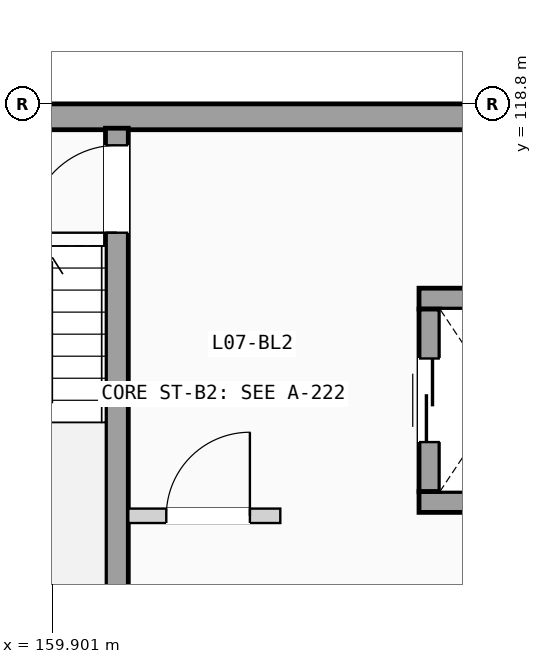
"""IFC4 building model, lengths in metres.
Left out: names, types, materials, properties, quantities, classifications, styles, units other than length and angle.
Written with IfcOpenShell. Run it as: python <this file> out.ifc"""

import sys

from ifc_helpers import new_model, si_unit, direction, frame, frame_2d, origin, place, context, subcontext, project, spatial, rectangle, extrude, element, fill, save


model = new_model("IFC4")
c1 = context("Model", 3, precision=1e-05, world=origin(), true_north=direction((0.0, 1.0)))
c2 = subcontext(c1, "Body", "Model", "MODEL_VIEW")
j1 = project(units=[si_unit("LENGTHUNIT", "METRE"), si_unit("PLANEANGLEUNIT", "RADIAN")], contexts=[c1])
p1 = place(None, origin())
s1 = spatial("IfcSite", under=j1, at=p1, CompositionType="ELEMENT")
p2 = place(p1, origin())
s2 = spatial("IfcBuilding", under=s1, at=p2, CompositionType="ELEMENT")
p3 = place(p2, frame((0.0, 0.0, 24.675)))
s3 = spatial("IfcBuildingStorey", under=s2, at=p3, CompositionType="ELEMENT", Elevation=24.675)
p4 = place(p3, frame((151.2, 118.63, 0.0), z_axis=(0.0, 0.0, 1.0), x_axis=(1.0, 0.0, 0.0)))
e1 = element("IfcWall", 1, at=p4, inside=s3, PredefinedType="SOLIDWALL", context=c2, shape_type="SweptSolid", body=[
    extrude(rectangle(XDim=21.6, YDim=0.34, at=frame_2d((10.8, 0.0))), origin(), (0.0, 0.0, 1.0), 2.9),
])
p5 = place(p3, frame((160.75, 111.48, 0.0), z_axis=(0.0, 0.0, 1.0), x_axis=(0.0, 1.0, 0.0)))
e2 = element("IfcWall", 2, at=p5, inside=s3, PredefinedType="SHEAR", context=c2, shape_type="SweptSolid", body=[
    extrude(rectangle(XDim=7.0, YDim=0.3, at=frame_2d((3.5, 0.0))), origin(), (0.0, 0.0, 1.0), 2.9),
])
p6 = place(p5, frame((5.625, 0.0, 0.0)))
e3 = element("IfcOpeningElement", 3, at=p6, cuts=e2, PredefinedType="OPENING", context=c2, shape_type="SweptSolid", body=[
    extrude(rectangle(XDim=1.15, YDim=2.12, at=frame_2d((0.575, 1.06))), frame((0.0, 0.16, 0.0), z_axis=(0.0, -1.0, 0.0), x_axis=(1.0, 0.0, 0.0)), (0.0, 0.0, 1.0), 0.32),
])
for number, where, z_axis, x_axis in (
    (4, (164.725, 113.562, 0.0), (0.0, 0.0, 1.0), (1.0, 0.0, 0.0)),
    (5, (164.725, 116.238, 0.0), (0.0, 0.0, 1.0), (1.0, 0.0, 0.0)),
):
    element("IfcWall", number, at=place(p3, frame(where, z_axis=z_axis, x_axis=x_axis)), inside=s3, PredefinedType="SHEAR", context=c2, shape_type="SweptSolid", body=[
        extrude(rectangle(XDim=2.15, YDim=0.275, at=frame_2d((1.075, 0.0))), origin(), (0.0, 0.0, 1.0), 2.9),
    ])
p7 = place(p3, frame((164.863, 113.7, 0.0), z_axis=(0.0, 0.0, 1.0), x_axis=(0.0, 1.0, 0.0)))
e6 = element("IfcWall", 6, at=p7, inside=s3, PredefinedType="SHEAR", context=c2, shape_type="SweptSolid", body=[
    extrude(rectangle(XDim=2.4, YDim=0.275, at=frame_2d((1.2, 0.0))), origin(), (0.0, 0.0, 1.0), 2.9),
])
p8 = place(p7, frame((0.65, 0.0, 0.0)))
e7 = element("IfcOpeningElement", 7, at=p8, cuts=e6, PredefinedType="OPENING", context=c2, shape_type="SweptSolid", body=[
    extrude(rectangle(XDim=1.1, YDim=2.15, at=frame_2d((0.55, 1.075))), frame((0.0, 0.147, 0.0), z_axis=(0.0, -1.0, 0.0), x_axis=(1.0, 0.0, 0.0)), (0.0, 0.0, 1.0), 0.295),
])
p9 = place(p3, frame((160.9, 113.38, 0.0), z_axis=(0.0, 0.0, 1.0), x_axis=(1.0, 0.0, 0.0)))
e8 = element("IfcWall", 8, at=p9, inside=s3, PredefinedType="PARTITIONING", context=c2, shape_type="SweptSolid", body=[
    extrude(rectangle(XDim=2.0, YDim=0.19, at=frame_2d((1.0, 0.0))), origin(), (0.0, 0.0, 1.0), 2.87),
])
p10 = place(p9, frame((0.5, 0.0, 0.0)))
e9 = element("IfcOpeningElement", 9, at=p10, cuts=e8, PredefinedType="OPENING", context=c2, shape_type="SweptSolid", body=[
    extrude(rectangle(XDim=1.1, YDim=2.12, at=frame_2d((0.55, 1.06))), frame((0.0, 0.105, 0.0), z_axis=(0.0, -1.0, 0.0), x_axis=(1.0, 0.0, 0.0)), (0.0, 0.0, 1.0), 0.21),
])
p11 = place(p6, origin())
e10 = element("IfcDoor", 10, at=p11, inside=s3, OperationType="SINGLE_SWING_LEFT", PredefinedType="DOOR", context=c2, shape_type="SweptSolid", body=[
    extrude(rectangle(XDim=1.15, YDim=2.12, at=frame_2d((0.575, 1.06))), frame((0.0, 0.025, 0.0), z_axis=(0.0, -1.0, 0.0), x_axis=(1.0, 0.0, 0.0)), (0.0, 0.0, 1.0), 0.05),
])
fill(e3, e10)
p12 = place(p8, origin())
e11 = element("IfcDoor", 11, at=p12, inside=s3, OperationType="SLIDING_TO_LEFT", PredefinedType="DOOR", context=c2, shape_type="SweptSolid", body=[
    extrude(rectangle(XDim=1.1, YDim=2.15, at=frame_2d((0.55, 1.075))), frame((0.0, 0.025, 0.0), z_axis=(0.0, -1.0, 0.0), x_axis=(1.0, 0.0, 0.0)), (0.0, 0.0, 1.0), 0.05),
])
fill(e7, e11)
p13 = place(p10, origin())
e12 = element("IfcDoor", 12, at=p13, inside=s3, OperationType="SINGLE_SWING_RIGHT", PredefinedType="DOOR", context=c2, shape_type="SweptSolid", body=[
    extrude(rectangle(XDim=1.1, YDim=2.12, at=frame_2d((0.55, 1.06))), frame((0.0, 0.025, 0.0), z_axis=(0.0, -1.0, 0.0), x_axis=(1.0, 0.0, 0.0)), (0.0, 0.0, 1.0), 0.05),
])
fill(e9, e12)
save(model, sys.argv[1])
